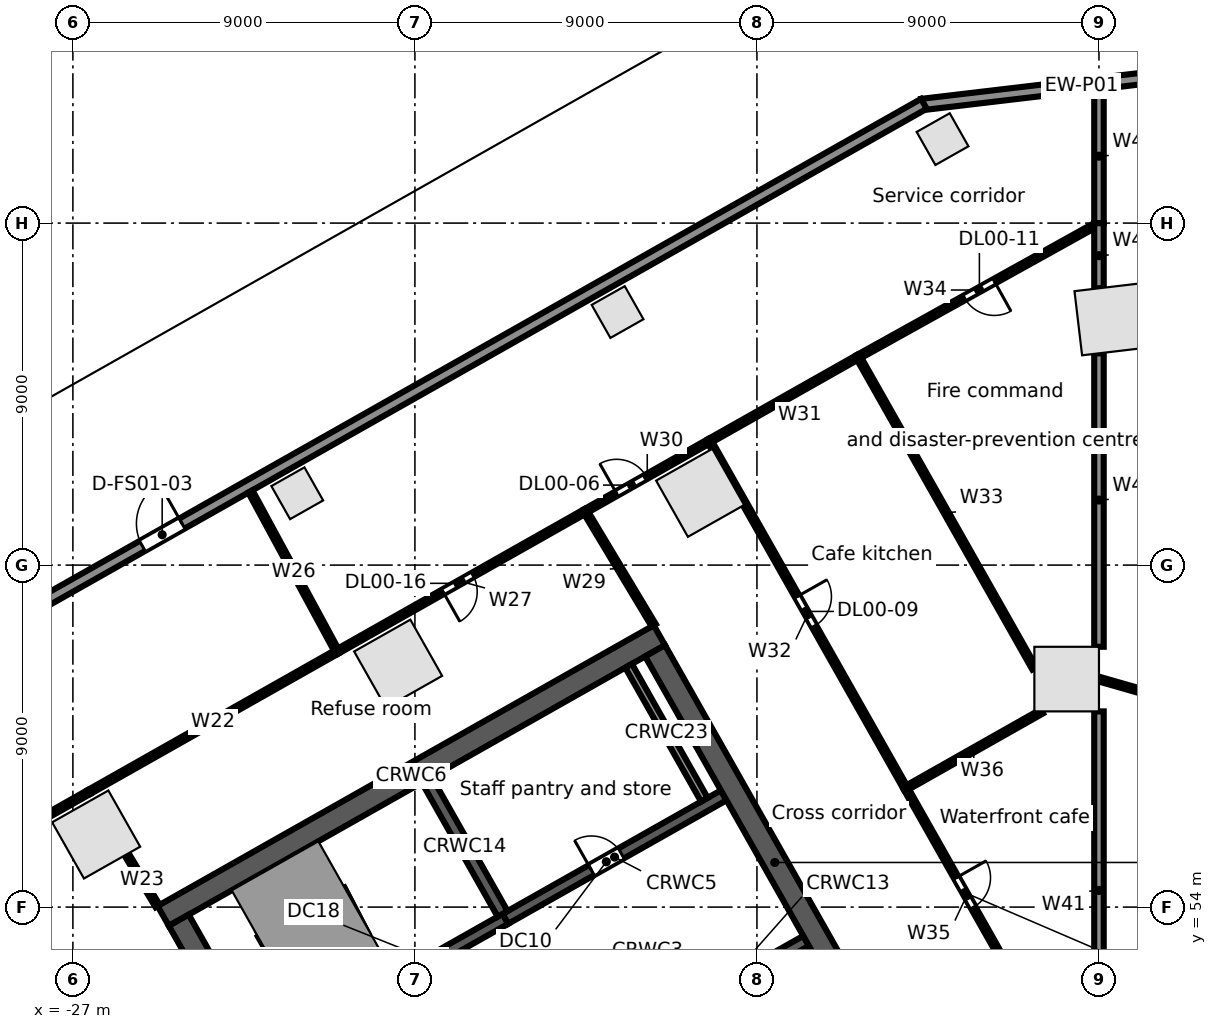
"""IFC4 building model, lengths in metres.
Left out: names, types, materials, properties, quantities, classifications, styles, units other than length and angle.
Written with IfcOpenShell. Run it as: python <this file> out.ifc"""

import sys

from ifc_helpers import new_model, si_unit, direction, frame, frame_2d, origin, origin_2d, place, context, subcontext, project, spatial, rectangle, extrude, element, fill, save


model = new_model("IFC4")
c1 = context("Model", 3, precision=1e-05, world=origin(), true_north=direction((0.0, 1.0)))
c2 = subcontext(c1, "Body", "Model", "MODEL_VIEW")
j1 = project(units=[si_unit("LENGTHUNIT", "METRE"), si_unit("PLANEANGLEUNIT", "RADIAN")], contexts=[c1])
p1 = place(None, origin())
s1 = spatial("IfcSite", under=j1, at=p1, CompositionType="ELEMENT")
p2 = place(p1, origin())
s2 = spatial("IfcBuilding", under=s1, at=p2, CompositionType="ELEMENT")
p3 = place(p2, origin())
s3 = spatial("IfcBuildingStorey", under=s2, at=p3, CompositionType="ELEMENT", Elevation=0.0)
for number, where, z_axis, x_axis in (
    (1, (0.3, 69.464, 0.0), (0.0, 0.0, 1.0), (-0.993, -0.118, 0.0)),
    (2, (-10.495, 64.902, 0.0), (0.0, 0.0, 1.0), (-0.87, -0.492, 0.0)),
    (3, (-18.441, 60.406, 0.0), (0.0, 0.0, 1.0), (-0.87, -0.492, 0.0)),
    (4, (-26.388, 55.91, 0.0), (0.0, 0.0, 1.0), (-0.87, -0.492, 0.0)),
    (5, (-0.85, 60.0, 0.0), (0.0, 0.0, 1.0), (0.0, 1.0, 0.0)),
):
    element("IfcColumn", number, at=place(p3, frame(where, z_axis=z_axis, x_axis=x_axis)), inside=s3, PredefinedType="COLUMN", context=c2, shape_type="SweptSolid", body=[
        extrude(rectangle(XDim=1.7, YDim=1.7, at=origin_2d()), origin(), (0.0, 0.0, 1.0), 6.5),
    ])
for number, where, z_axis, x_axis in (
    (6, (-4.116, 74.21, 0.0), (0.0, 0.0, 1.0), (-0.87, -0.492, 0.0)),
    (7, (-12.667, 69.659, 0.0), (0.0, 0.0, 1.0), (-0.87, -0.492, 0.0)),
    (8, (-21.096, 64.89, 0.0), (0.0, 0.0, 1.0), (-0.87, -0.492, 0.0)),
):
    element("IfcColumn", number, at=place(p3, frame(where, z_axis=z_axis, x_axis=x_axis)), inside=s3, PredefinedType="COLUMN", context=c2, shape_type="SweptSolid", body=[
        extrude(rectangle(XDim=1.0, YDim=1.0, at=origin_2d()), origin(), (0.0, 0.0, 1.0), 6.5),
    ])
p4 = place(p3, frame((-4.663, 75.12, 0.0), z_axis=(0.0, 0.0, 1.0), x_axis=(0.993069631717, 0.11752747152, 0.0)))
e9 = element("IfcWall", 9, at=p4, inside=s3, PredefinedType="STANDARD", context=c2, shape_type="SweptSolid", body=[
    extrude(rectangle(XDim=8.463, YDim=0.3, at=frame_2d((4.231, 0.0))), origin(), (0.0, 0.0, 1.0), 6.15),
])
p5 = place(p3, frame((-63.707, 41.701, 0.0), z_axis=(0.0, 0.0, 1.0), x_axis=(0.870355510268, 0.492423888277, 0.0)))
e10 = element("IfcWall", 10, at=p5, inside=s3, PredefinedType="STANDARD", context=c2, shape_type="SweptSolid", body=[
    extrude(rectangle(XDim=67.903, YDim=0.3, at=frame_2d((33.952, 0.0))), origin(), (0.0, 0.0, 1.0), 6.15),
])
p6 = place(p5, frame((44.274, 0.0, 0.0)))
e11 = element("IfcOpeningElement", 11, at=p6, cuts=e10, PredefinedType="OPENING", context=c2, shape_type="SweptSolid", body=[
    extrude(rectangle(XDim=1.2, YDim=2.4, at=frame_2d((0.6, 1.2))), frame((0.0, 0.16, 0.0), z_axis=(0.0, -1.0, 0.0), x_axis=(1.0, 0.0, 0.0)), (0.0, 0.0, 1.0), 0.32),
])
p7 = place(p5, frame((15.222, 0.0, 0.0)))
e12 = element("IfcOpeningElement", 12, at=p7, cuts=e10, PredefinedType="OPENING", context=c2, shape_type="SweptSolid", body=[
    extrude(rectangle(XDim=1.2, YDim=2.4, at=frame_2d((0.6, 1.2))), frame((0.0, 0.16, 0.0), z_axis=(0.0, -1.0, 0.0), x_axis=(1.0, 0.0, 0.0)), (0.0, 0.0, 1.0), 0.32),
])
p8 = place(p3, frame((-13.365, 49.911, 0.0), z_axis=(0.0, 0.0, 1.0), x_axis=(0.870340995471, 0.49244954219, 0.0)))
e13 = element("IfcWall", 13, at=p8, inside=s3, PredefinedType="SOLIDWALL", context=c2, shape_type="SweptSolid", body=[
    extrude(rectangle(XDim=6.5, YDim=0.3, at=frame_2d((3.25, 0.0))), origin(), (0.0, 0.0, 1.0), 6.15),
])
p9 = place(p8, frame((0.75, 0.0, 0.0)))
e14 = element("IfcOpeningElement", 14, at=p9, cuts=e13, PredefinedType="OPENING", context=c2, shape_type="SweptSolid", body=[
    extrude(rectangle(XDim=0.9, YDim=2.1, at=frame_2d((0.45, 1.05))), frame((0.0, 0.16, 0.0), z_axis=(0.0, -1.0, 0.0), x_axis=(1.0, 0.0, 0.0)), (0.0, 0.0, 1.0), 0.32),
])
p10 = place(p8, frame((4.15, 0.0, 0.0)))
e15 = element("IfcOpeningElement", 15, at=p10, cuts=e13, PredefinedType="OPENING", context=c2, shape_type="SweptSolid", body=[
    extrude(rectangle(XDim=0.9, YDim=2.1, at=frame_2d((0.45, 1.05))), frame((0.0, 0.16, 0.0), z_axis=(0.0, -1.0, 0.0), x_axis=(1.0, 0.0, 0.0)), (0.0, 0.0, 1.0), 0.32),
])
p11 = place(p3, frame((-21.885, 50.146, 0.0), z_axis=(0.0, 0.0, 1.0), x_axis=(0.870359411463, 0.492416992881, 0.0)))
e16 = element("IfcWall", 16, at=p11, inside=s3, PredefinedType="SOLIDWALL", context=c2, shape_type="SweptSolid", body=[
    extrude(rectangle(XDim=7.2, YDim=0.3, at=frame_2d((3.6, 0.0))), origin(), (0.0, 0.0, 1.0), 6.15),
])
p12 = place(p11, frame((0.2, 0.0, 0.0)))
e17 = element("IfcOpeningElement", 17, at=p12, cuts=e16, PredefinedType="OPENING", context=c2, shape_type="SweptSolid", body=[
    extrude(rectangle(XDim=1.0, YDim=2.1, at=frame_2d((0.5, 1.05))), frame((0.0, 0.16, 0.0), z_axis=(0.0, -1.0, 0.0), x_axis=(1.0, 0.0, 0.0)), (0.0, 0.0, 1.0), 0.32),
])
p13 = place(p3, frame((-15.618, 53.691, 0.0), z_axis=(0.0, 0.0, 1.0), x_axis=(0.870356769198, 0.492421663121, 0.0)))
e18 = element("IfcWall", 18, at=p13, inside=s3, PredefinedType="SOLIDWALL", context=c2, shape_type="SweptSolid", body=[
    extrude(rectangle(XDim=6.6, YDim=0.3, at=frame_2d((3.3, 0.0))), origin(), (0.0, 0.0, 1.0), 6.15),
])
p14 = place(p13, frame((2.6, 0.0, 0.0)))
e19 = element("IfcOpeningElement", 19, at=p14, cuts=e18, PredefinedType="OPENING", context=c2, shape_type="SweptSolid", body=[
    extrude(rectangle(XDim=0.9, YDim=2.1, at=frame_2d((0.45, 1.05))), frame((0.0, 0.16, 0.0), z_axis=(0.0, -1.0, 0.0), x_axis=(1.0, 0.0, 0.0)), (0.0, 0.0, 1.0), 0.32),
])
p15 = place(p3, frame((-24.623, 53.767, 0.0), z_axis=(0.0, 0.0, 1.0), x_axis=(0.870356627484, 0.492421913601, 0.0)))
e20 = element("IfcWall", 20, at=p15, inside=s3, PredefinedType="SOLIDWALL", context=c2, shape_type="SweptSolid", body=[
    extrude(rectangle(XDim=15.0, YDim=0.6, at=frame_2d((7.5, 0.0))), origin(), (0.0, 0.0, 1.0), 6.15),
])
p16 = place(p3, frame((-24.214, 53.654, 0.0), z_axis=(0.0, 0.0, 1.0), x_axis=(0.492441221355, -0.870345703448, 0.0)))
e21 = element("IfcWall", 21, at=p16, inside=s3, PredefinedType="SOLIDWALL", context=c2, shape_type="SweptSolid", body=[
    extrude(rectangle(XDim=12.8, YDim=0.6, at=frame_2d((6.4, 0.0))), origin(), (0.0, 0.0, 1.0), 6.15),
])
p17 = place(p16, frame((5.8, 0.0, 0.0)))
e22 = element("IfcOpeningElement", 22, at=p17, cuts=e21, PredefinedType="OPENING", context=c2, shape_type="SweptSolid", body=[
    extrude(rectangle(XDim=1.2, YDim=2.1, at=frame_2d((0.6, 1.05))), frame((0.0, 0.31, 0.0), z_axis=(0.0, -1.0, 0.0), x_axis=(1.0, 0.0, 0.0)), (0.0, 0.0, 1.0), 0.62),
])
p18 = place(p3, frame((-17.686, 57.347, 0.0), z_axis=(0.0, 0.0, 1.0), x_axis=(0.492420746998, -0.870357287513, 0.0)))
e23 = element("IfcWall", 23, at=p18, inside=s3, PredefinedType="SOLIDWALL", context=c2, shape_type="SweptSolid", body=[
    extrude(rectangle(XDim=4.05, YDim=0.3, at=frame_2d((2.025, 0.0))), origin(), (0.0, 0.0, 1.0), 6.15),
])
p19 = place(p3, frame((-12.377, 60.351, 0.0), z_axis=(0.0, 0.0, 1.0), x_axis=(0.492440575896, -0.870346068648, 0.0)))
e24 = element("IfcWall", 24, at=p19, inside=s3, PredefinedType="SOLIDWALL", context=c2, shape_type="SweptSolid", body=[
    extrude(rectangle(XDim=4.05, YDim=0.2, at=frame_2d((2.025, 0.0))), origin(), (0.0, 0.0, 1.0), 6.15),
])
p20 = place(p3, frame((-11.681, 60.744, 0.0), z_axis=(0.0, 0.0, 1.0), x_axis=(0.492426772896, -0.870353878221, 0.0)))
e25 = element("IfcWall", 25, at=p20, inside=s3, PredefinedType="SOLIDWALL", context=c2, shape_type="SweptSolid", body=[
    extrude(rectangle(XDim=12.8, YDim=0.6, at=frame_2d((6.4, 0.0))), origin(), (0.0, 0.0, 1.0), 6.15),
])
p21 = place(p3, frame((-33.536, 53.09, 0.0), z_axis=(0.0, 0.0, 1.0), x_axis=(0.870327439455, 0.492473499928, 0.0)))
e26 = element("IfcWall", 26, at=p21, inside=s3, PredefinedType="PARTITIONING", context=c2, shape_type="SweptSolid", body=[
    extrude(rectangle(XDim=8.0, YDim=0.125, at=frame_2d((4.0, 0.0))), origin(), (0.0, 0.0, 1.0), 5.212),
])
p22 = place(p21, frame((3.45, 0.0, 0.0)))
e27 = element("IfcOpeningElement", 27, at=p22, cuts=e26, PredefinedType="OPENING", context=c2, shape_type="SweptSolid", body=[
    extrude(rectangle(XDim=0.9, YDim=2.1, at=frame_2d((0.45, 1.05))), frame((0.0, 0.073, 0.0), z_axis=(0.0, -1.0, 0.0), x_axis=(1.0, 0.0, 0.0)), (0.0, 0.0, 1.0), 0.145),
])
p23 = place(p3, frame((-26.573, 57.03, 0.0), z_axis=(0.0, 0.0, 1.0), x_axis=(0.870354792164, 0.492425157519, 0.0)))
e28 = element("IfcWall", 28, at=p23, inside=s3, PredefinedType="PARTITIONING", context=c2, shape_type="SweptSolid", body=[
    extrude(rectangle(XDim=7.499, YDim=0.125, at=frame_2d((3.75, 0.0))), origin(), (0.0, 0.0, 1.0), 6.15),
])
p24 = place(p3, frame((-25.587, 55.387, 0.0), z_axis=(0.0, 0.0, 1.0), x_axis=(0.514767546849, -0.857329792268, 0.0)))
e29 = element("IfcWall", 29, at=p24, inside=s3, PredefinedType="PARTITIONING", context=c2, shape_type="SweptSolid", body=[
    extrude(rectangle(XDim=1.585, YDim=0.125, at=frame_2d((0.792, 0.0))), origin(), (0.0, 0.0, 1.0), 6.15),
])
p25 = place(p3, frame((-22.33, 64.939, 0.0), z_axis=(0.0, 0.0, 1.0), x_axis=(0.476360236723, -0.879250206067, 0.0)))
e30 = element("IfcWall", 30, at=p25, inside=s3, PredefinedType="PARTITIONING", context=c2, shape_type="SweptSolid", body=[
    extrude(rectangle(XDim=4.795, YDim=0.125, at=frame_2d((2.397, 0.0))), origin(), (0.0, 0.0, 1.0), 5.43),
])
p26 = place(p3, frame((-20.046, 60.723, 0.0), z_axis=(0.0, 0.0, 1.0), x_axis=(0.870364520461, 0.492407962489, 0.0)))
e31 = element("IfcWall", 31, at=p26, inside=s3, PredefinedType="PARTITIONING", context=c2, shape_type="SweptSolid", body=[
    extrude(rectangle(XDim=7.5, YDim=0.125, at=frame_2d((3.75, 0.0))), origin(), (0.0, 0.0, 1.0), 5.43),
])
p27 = place(p26, frame((3.2, 0.0, 0.0)))
e32 = element("IfcOpeningElement", 32, at=p27, cuts=e31, PredefinedType="OPENING", context=c2, shape_type="SweptSolid", body=[
    extrude(rectangle(XDim=0.9, YDim=2.1, at=frame_2d((0.45, 1.05))), frame((0.0, 0.073, 0.0), z_axis=(0.0, -1.0, 0.0), x_axis=(1.0, 0.0, 0.0)), (0.0, 0.0, 1.0), 0.145),
])
p28 = place(p3, frame((-13.518, 64.416, 0.0), z_axis=(0.0, 0.0, 1.0), x_axis=(0.514875058642, -0.857265229663, 0.0)))
e33 = element("IfcWall", 33, at=p28, inside=s3, PredefinedType="PARTITIONING", context=c2, shape_type="SweptSolid", body=[
    extrude(rectangle(XDim=3.502, YDim=0.125, at=frame_2d((1.751, 0.0))), origin(), (0.0, 0.0, 1.0), 5.43),
])
p29 = place(p3, frame((-13.518, 64.416, 0.0), z_axis=(0.0, 0.0, 1.0), x_axis=(0.870338454914, 0.492454032268, 0.0)))
e34 = element("IfcWall", 34, at=p29, inside=s3, PredefinedType="PARTITIONING", context=c2, shape_type="SweptSolid", body=[
    extrude(rectangle(XDim=3.75, YDim=0.125, at=frame_2d((1.875, 0.0))), origin(), (0.0, 0.0, 1.0), 5.212),
])
p30 = place(p29, frame((0.95, 0.0, 0.0)))
e35 = element("IfcOpeningElement", 35, at=p30, cuts=e34, PredefinedType="OPENING", context=c2, shape_type="SweptSolid", body=[
    extrude(rectangle(XDim=0.9, YDim=2.1, at=frame_2d((0.45, 1.05))), frame((0.0, 0.073, 0.0), z_axis=(0.0, -1.0, 0.0), x_axis=(1.0, 0.0, 0.0)), (0.0, 0.0, 1.0), 0.145),
])
p31 = place(p3, frame((-10.254, 66.263, 0.0), z_axis=(0.0, 0.0, 1.0), x_axis=(0.870454697906, 0.492248533664, 0.0)))
e36 = element("IfcWall", 36, at=p31, inside=s3, PredefinedType="PARTITIONING", context=c2, shape_type="SweptSolid", body=[
    extrude(rectangle(XDim=4.5, YDim=0.125, at=frame_2d((2.25, 0.0))), origin(), (0.0, 0.0, 1.0), 6.15),
])
p32 = place(p3, frame((-10.254, 66.263, 0.0), z_axis=(0.0, 0.0, 1.0), x_axis=(0.492448703838, -0.87034146982, 0.0)))
e37 = element("IfcWall", 37, at=p32, inside=s3, PredefinedType="PARTITIONING", context=c2, shape_type="SweptSolid", body=[
    extrude(rectangle(XDim=10.5, YDim=0.125, at=frame_2d((5.25, 0.0))), origin(), (0.0, 0.0, 1.0), 5.212),
])
p33 = place(p32, frame((4.7, 0.0, 0.0)))
e38 = element("IfcOpeningElement", 38, at=p33, cuts=e37, PredefinedType="OPENING", context=c2, shape_type="SweptSolid", body=[
    extrude(rectangle(XDim=0.9, YDim=2.1, at=frame_2d((0.45, 1.05))), frame((0.0, 0.073, 0.0), z_axis=(0.0, -1.0, 0.0), x_axis=(1.0, 0.0, 0.0)), (0.0, 0.0, 1.0), 0.145),
])
p34 = place(p3, frame((-6.337, 68.478, 0.0), z_axis=(0.0, 0.0, 1.0), x_axis=(0.492412602502, -0.870361895361, 0.0)))
e39 = element("IfcWall", 39, at=p34, inside=s3, PredefinedType="PARTITIONING", context=c2, shape_type="SweptSolid", body=[
    extrude(rectangle(XDim=9.417, YDim=0.125, at=frame_2d((4.708, 0.0))), origin(), (0.0, 0.0, 1.0), 5.212),
])
p35 = place(p3, frame((-6.337, 68.478, 0.0), z_axis=(0.0, 0.0, 1.0), x_axis=(0.87407148623, 0.485797320864, 0.0)))
e40 = element("IfcWall", 40, at=p35, inside=s3, PredefinedType="PARTITIONING", context=c2, shape_type="SweptSolid", body=[
    extrude(rectangle(XDim=7.25, YDim=0.125, at=frame_2d((3.625, 0.0))), origin(), (0.0, 0.0, 1.0), 5.43),
])
p36 = place(p35, frame((3.2, 0.0, 0.0)))
e41 = element("IfcOpeningElement", 41, at=p36, cuts=e40, PredefinedType="OPENING", context=c2, shape_type="SweptSolid", body=[
    extrude(rectangle(XDim=0.9, YDim=2.1, at=frame_2d((0.45, 1.05))), frame((0.0, 0.073, 0.0), z_axis=(0.0, -1.0, 0.0), x_axis=(1.0, 0.0, 0.0)), (0.0, 0.0, 1.0), 0.145),
])
p37 = place(p3, frame((-5.083, 57.124, 0.0), z_axis=(0.0, 0.0, 1.0), x_axis=(0.49235182095, -0.870396280097, 0.0)))
e42 = element("IfcWall", 42, at=p37, inside=s3, PredefinedType="PARTITIONING", context=c2, shape_type="SweptSolid", body=[
    extrude(rectangle(XDim=6.499, YDim=0.125, at=frame_2d((3.25, 0.0))), origin(), (0.0, 0.0, 1.0), 6.15),
])
p38 = place(p37, frame((2.7, 0.0, 0.0)))
e43 = element("IfcOpeningElement", 43, at=p38, cuts=e42, PredefinedType="OPENING", context=c2, shape_type="SweptSolid", body=[
    extrude(rectangle(XDim=0.9, YDim=2.1, at=frame_2d((0.45, 1.05))), frame((0.0, 0.073, 0.0), z_axis=(0.0, -1.0, 0.0), x_axis=(1.0, 0.0, 0.0)), (0.0, 0.0, 1.0), 0.145),
])
p39 = place(p3, frame((-5.083, 57.124, 0.0), z_axis=(0.0, 0.0, 1.0), x_axis=(0.870317335247, 0.492491356238, 0.0)))
e44 = element("IfcWall", 44, at=p39, inside=s3, PredefinedType="PARTITIONING", context=c2, shape_type="SweptSolid", body=[
    extrude(rectangle(XDim=4.114, YDim=0.125, at=frame_2d((2.057, 0.0))), origin(), (0.0, 0.0, 1.0), 5.212),
])
p40 = place(p3, frame((0.0, 49.726, 0.0), z_axis=(0.0, 0.0, 1.0), x_axis=(0.0, 1.0, 0.0)))
e45 = element("IfcWall", 45, at=p40, inside=s3, PredefinedType="PARTITIONING", context=c2, shape_type="SweptSolid", body=[
    extrude(rectangle(XDim=9.424, YDim=0.25, at=frame_2d((4.712, 0.0))), origin(), (0.0, 0.0, 1.0), 6.15),
])
p41 = place(p3, frame((0.0, 60.0, 0.0), z_axis=(0.0, 0.0, 1.0), x_axis=(0.961263282922, -0.275631821288, 0.0)))
e46 = element("IfcWall", 46, at=p41, inside=s3, PredefinedType="PARTITIONING", context=c2, shape_type="SweptSolid", body=[
    extrude(rectangle(XDim=9.063, YDim=0.125, at=frame_2d((4.531, 0.0))), origin(), (0.0, 0.0, 1.0), 5.212),
])
p42 = place(p3, frame((0.0, 60.85, 0.0), z_axis=(0.0, 0.0, 1.0), x_axis=(0.0, 1.0, 0.0)))
e47 = element("IfcWall", 47, at=p42, inside=s3, PredefinedType="PARTITIONING", context=c2, shape_type="SweptSolid", body=[
    extrude(rectangle(XDim=7.723, YDim=0.25, at=frame_2d((3.861, 0.0))), origin(), (0.0, 0.0, 1.0), 5.43),
])
p43 = place(p3, frame((0.0, 70.285, 0.0), z_axis=(0.0, 0.0, 1.0), x_axis=(0.0, 1.0, 0.0)))
e48 = element("IfcWall", 48, at=p43, inside=s3, PredefinedType="PARTITIONING", context=c2, shape_type="SweptSolid", body=[
    extrude(rectangle(XDim=1.715, YDim=0.25, at=frame_2d((0.857, 0.0))), origin(), (0.0, 0.0, 1.0), 6.15),
])
p44 = place(p3, frame((0.0, 72.0, 0.0), z_axis=(0.0, 0.0, 1.0), x_axis=(0.0, 1.0, 0.0)))
e49 = element("IfcWall", 49, at=p44, inside=s3, PredefinedType="PARTITIONING", context=c2, shape_type="SweptSolid", body=[
    extrude(rectangle(XDim=3.521, YDim=0.25, at=frame_2d((1.76, 0.0))), origin(), (0.0, 0.0, 1.0), 5.524),
])
p45 = place(p6, origin())
e50 = element("IfcDoor", 50, at=p45, inside=s3, OperationType="SINGLE_SWING_RIGHT", PredefinedType="DOOR", context=c2, shape_type="SweptSolid", body=[
    extrude(rectangle(XDim=1.2, YDim=2.4, at=frame_2d((0.6, 1.2))), frame((0.0, 0.025, 0.0), z_axis=(0.0, -1.0, 0.0), x_axis=(1.0, 0.0, 0.0)), (0.0, 0.0, 1.0), 0.05),
])
fill(e11, e50)
p46 = place(p14, origin())
e51 = element("IfcDoor", 51, at=p46, inside=s3, OperationType="SINGLE_SWING_LEFT", PredefinedType="DOOR", context=c2, shape_type="SweptSolid", body=[
    extrude(rectangle(XDim=0.9, YDim=2.1, at=frame_2d((0.45, 1.05))), frame((0.0, 0.025, 0.0), z_axis=(0.0, -1.0, 0.0), x_axis=(1.0, 0.0, 0.0)), (0.0, 0.0, 1.0), 0.05),
])
fill(e19, e51)
p47 = place(p30, origin())
e52 = element("IfcDoor", 52, at=p47, inside=s3, OperationType="SINGLE_SWING_LEFT", PredefinedType="DOOR", context=c2, shape_type="SweptSolid", body=[
    extrude(rectangle(XDim=0.9, YDim=2.1, at=frame_2d((0.45, 1.05))), frame((0.0, 0.025, 0.0), z_axis=(0.0, -1.0, 0.0), x_axis=(1.0, 0.0, 0.0)), (0.0, 0.0, 1.0), 0.05),
])
fill(e35, e52)
p48 = place(p33, origin())
e53 = element("IfcDoor", 53, at=p48, inside=s3, OperationType="SINGLE_SWING_LEFT", PredefinedType="DOOR", context=c2, shape_type="SweptSolid", body=[
    extrude(rectangle(XDim=0.9, YDim=2.1, at=frame_2d((0.45, 1.05))), frame((0.0, 0.025, 0.0), z_axis=(0.0, -1.0, 0.0), x_axis=(1.0, 0.0, 0.0)), (0.0, 0.0, 1.0), 0.05),
])
fill(e38, e53)
p49 = place(p38, origin())
e54 = element("IfcDoor", 54, at=p49, inside=s3, OperationType="SINGLE_SWING_LEFT", PredefinedType="DOOR", context=c2, shape_type="SweptSolid", body=[
    extrude(rectangle(XDim=0.9, YDim=2.1, at=frame_2d((0.45, 1.05))), frame((0.0, 0.025, 0.0), z_axis=(0.0, -1.0, 0.0), x_axis=(1.0, 0.0, 0.0)), (0.0, 0.0, 1.0), 0.05),
])
fill(e43, e54)
p50 = place(p36, frame((0.9, 0.0, 0.0), z_axis=(0.0, 0.0, 1.0), x_axis=(-1.0, 0.0, 0.0)))
e55 = element("IfcDoor", 55, at=p50, inside=s3, OperationType="SINGLE_SWING_LEFT", PredefinedType="DOOR", context=c2, shape_type="SweptSolid", body=[
    extrude(rectangle(XDim=0.9, YDim=2.1, at=frame_2d((0.45, 1.05))), frame((0.0, 0.025, 0.0), z_axis=(0.0, -1.0, 0.0), x_axis=(1.0, 0.0, 0.0)), (0.0, 0.0, 1.0), 0.05),
])
fill(e41, e55)
p51 = place(p27, frame((0.9, 0.0, 0.0), z_axis=(0.0, 0.0, 1.0), x_axis=(-1.0, 0.0, 0.0)))
e56 = element("IfcDoor", 56, at=p51, inside=s3, OperationType="SINGLE_SWING_RIGHT", PredefinedType="DOOR", context=c2, shape_type="SweptSolid", body=[
    extrude(rectangle(XDim=0.9, YDim=2.1, at=frame_2d((0.45, 1.05))), frame((0.0, 0.025, 0.0), z_axis=(0.0, -1.0, 0.0), x_axis=(1.0, 0.0, 0.0)), (0.0, 0.0, 1.0), 0.05),
])
fill(e32, e56)
save(model, sys.argv[1])
